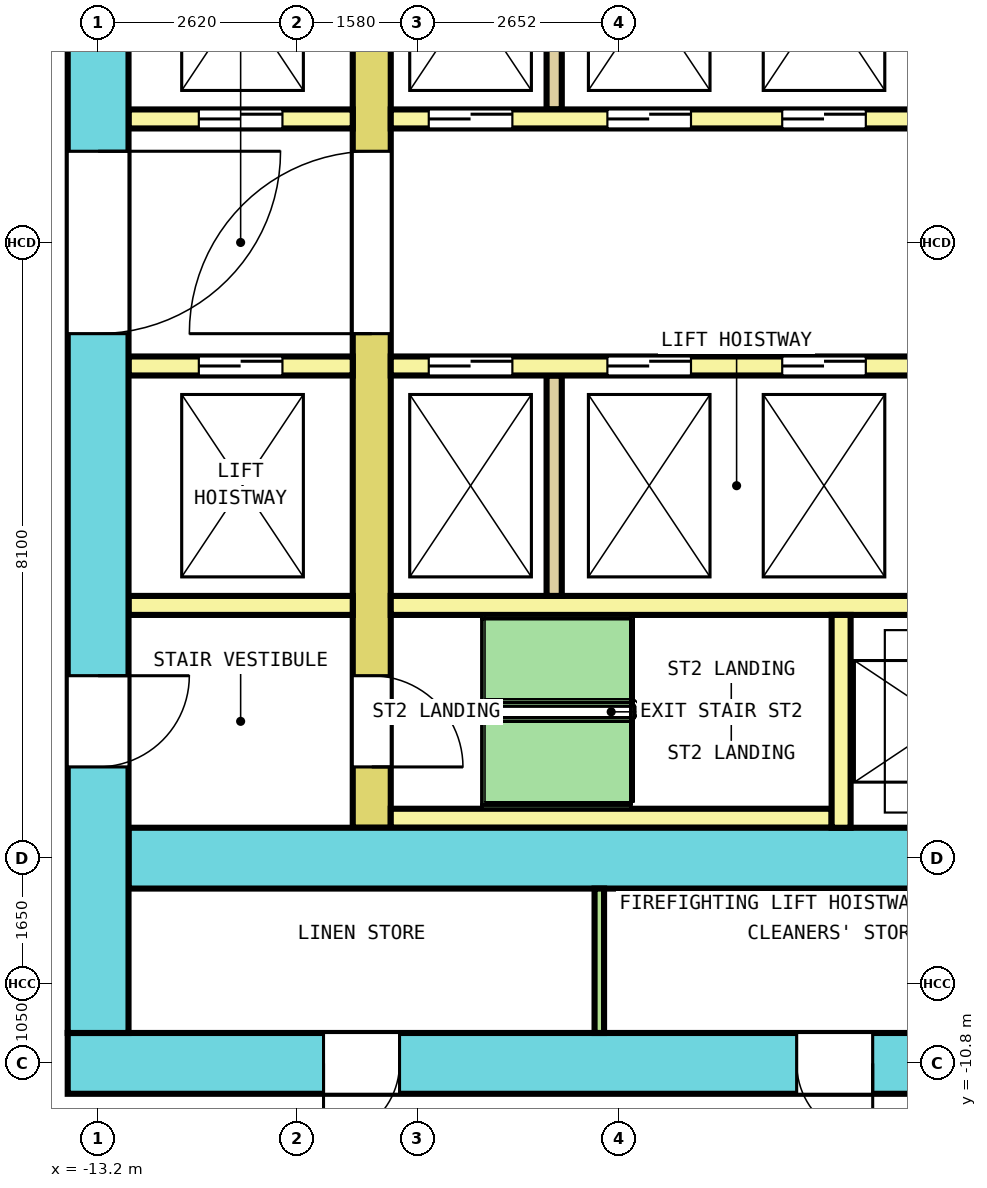
"""IFC4 building model, lengths in metres.
Left out: names, types, materials, properties, quantities, classifications, styles, units other than length and angle.
Written with IfcOpenShell. Run it as: python <this file> out.ifc"""

import sys

from ifc_helpers import new_model, si_unit, direction, frame, frame_2d, origin, place, context, subcontext, project, spatial, rectangle, extrude, element, fill, save


model = new_model("IFC4")
c1 = context("Model", 3, precision=1e-05, world=origin(), true_north=direction((0.0, 1.0)))
c2 = subcontext(c1, "Body", "Model", "MODEL_VIEW")
j1 = project(units=[si_unit("LENGTHUNIT", "METRE"), si_unit("PLANEANGLEUNIT", "RADIAN")], contexts=[c1])
p1 = place(None, origin())
s1 = spatial("IfcSite", under=j1, at=p1, CompositionType="ELEMENT")
p2 = place(p1, origin())
s2 = spatial("IfcBuilding", under=s1, at=p2, CompositionType="ELEMENT")
p3 = place(p2, frame((0.0, 0.0, 107.2)))
s3 = spatial("IfcBuildingStorey", under=s2, at=p3, CompositionType="ELEMENT", Elevation=107.2)
p4 = place(p3, frame((-13.6, -10.8, 0.0), z_axis=(0.0, 0.0, 1.0), x_axis=(1.0, 0.0, 0.0)))
e1 = element("IfcWall", 1, at=p4, inside=s3, PredefinedType="SHEAR", context=c2, shape_type="SweptSolid", body=[
    extrude(rectangle(XDim=27.2, YDim=0.8, at=frame_2d((13.6, 0.0))), origin(), (0.0, 0.0, 1.0), 5.7),
])
p5 = place(p4, frame((3.365, 0.0, 0.0)))
e2 = element("IfcOpeningElement", 2, at=p5, cuts=e1, PredefinedType="OPENING", context=c2, shape_type="SweptSolid", body=[
    extrude(rectangle(XDim=1.0, YDim=2.1, at=frame_2d((0.5, 1.05))), frame((0.0, 0.41, 0.0), z_axis=(0.0, -1.0, 0.0), x_axis=(1.0, 0.0, 0.0)), (0.0, 0.0, 1.0), 0.82),
])
p6 = place(p4, frame((9.591, 0.0, 0.0)))
e3 = element("IfcOpeningElement", 3, at=p6, cuts=e1, PredefinedType="OPENING", context=c2, shape_type="SweptSolid", body=[
    extrude(rectangle(XDim=1.0, YDim=2.1, at=frame_2d((0.5, 1.05))), frame((0.0, 0.41, 0.0), z_axis=(0.0, -1.0, 0.0), x_axis=(1.0, 0.0, 0.0)), (0.0, 0.0, 1.0), 0.82),
])
p7 = place(p4, frame((19.834, 0.0, 0.0)))
e4 = element("IfcOpeningElement", 4, at=p7, cuts=e1, PredefinedType="OPENING", context=c2, shape_type="SweptSolid", body=[
    extrude(rectangle(XDim=1.0, YDim=2.1, at=frame_2d((0.5, 1.05))), frame((0.0, 0.41, 0.0), z_axis=(0.0, -1.0, 0.0), x_axis=(1.0, 0.0, 0.0)), (0.0, 0.0, 1.0), 0.82),
])
p8 = place(p4, frame((23.909, 0.0, 0.0)))
e5 = element("IfcOpeningElement", 5, at=p8, cuts=e1, PredefinedType="OPENING", context=c2, shape_type="SweptSolid", body=[
    extrude(rectangle(XDim=1.0, YDim=2.1, at=frame_2d((0.5, 1.05))), frame((0.0, 0.41, 0.0), z_axis=(0.0, -1.0, 0.0), x_axis=(1.0, 0.0, 0.0)), (0.0, 0.0, 1.0), 0.82),
])
p9 = place(p4, frame((15.15, 0.0, 0.0)))
e6 = element("IfcOpeningElement", 6, at=p9, cuts=e1, PredefinedType="OPENING", context=c2, shape_type="SweptSolid", body=[
    extrude(rectangle(XDim=1.2, YDim=2.1, at=frame_2d((0.6, 1.05))), frame((0.0, 0.41, 0.0), z_axis=(0.0, -1.0, 0.0), x_axis=(1.0, 0.0, 0.0)), (0.0, 0.0, 1.0), 0.82),
])
p10 = place(p3, frame((-13.2, -10.4, 0.0), z_axis=(0.0, 0.0, 1.0), x_axis=(0.0, 1.0, 0.0)))
e7 = element("IfcWall", 7, at=p10, inside=s3, PredefinedType="SHEAR", context=c2, shape_type="SweptSolid", body=[
    extrude(rectangle(XDim=20.8, YDim=0.8, at=frame_2d((10.4, 0.0))), origin(), (0.0, 0.0, 1.0), 5.7),
])
p11 = place(p10, frame((9.2, 0.0, 0.0)))
e8 = element("IfcOpeningElement", 8, at=p11, cuts=e7, PredefinedType="OPENING", context=c2, shape_type="SweptSolid", body=[
    extrude(rectangle(XDim=2.4, YDim=2.1, at=frame_2d((1.2, 1.05))), frame((0.0, 0.41, 0.0), z_axis=(0.0, -1.0, 0.0), x_axis=(1.0, 0.0, 0.0)), (0.0, 0.0, 1.0), 0.82),
])
p12 = place(p10, frame((16.1, 0.0, 0.0)))
e9 = element("IfcOpeningElement", 9, at=p12, cuts=e7, PredefinedType="OPENING", context=c2, shape_type="SweptSolid", body=[
    extrude(rectangle(XDim=1.2, YDim=2.1, at=frame_2d((0.6, 1.05))), frame((0.0, 0.41, 0.0), z_axis=(0.0, -1.0, 0.0), x_axis=(1.0, 0.0, 0.0)), (0.0, 0.0, 1.0), 0.82),
])
p13 = place(p10, frame((3.5, 0.0, 0.0)))
e10 = element("IfcOpeningElement", 10, at=p13, cuts=e7, PredefinedType="OPENING", context=c2, shape_type="SweptSolid", body=[
    extrude(rectangle(XDim=1.2, YDim=2.1, at=frame_2d((0.6, 1.05))), frame((0.0, 0.41, 0.0), z_axis=(0.0, -1.0, 0.0), x_axis=(1.0, 0.0, 0.0)), (0.0, 0.0, 1.0), 0.82),
])
p14 = place(p3, frame((-12.8, -8.1, 0.0), z_axis=(0.0, 0.0, 1.0), x_axis=(1.0, 0.0, 0.0)))
e11 = element("IfcWall", 11, at=p14, inside=s3, PredefinedType="SHEAR", context=c2, shape_type="SweptSolid", body=[
    extrude(rectangle(XDim=25.6, YDim=0.8, at=frame_2d((12.8, 0.0))), origin(), (0.0, 0.0, 1.0), 5.7),
])
p15 = place(p14, frame((14.35, 0.0, 0.0)))
e12 = element("IfcOpeningElement", 12, at=p15, cuts=e11, PredefinedType="OPENING", context=c2, shape_type="SweptSolid", body=[
    extrude(rectangle(XDim=1.2, YDim=2.1, at=frame_2d((0.6, 1.05))), frame((0.0, 0.41, 0.0), z_axis=(0.0, -1.0, 0.0), x_axis=(1.0, 0.0, 0.0)), (0.0, 0.0, 1.0), 0.82),
])
p16 = place(p3, frame((-9.6, -7.7, 0.0), z_axis=(0.0, 0.0, 1.0), x_axis=(0.0, 1.0, 0.0)))
e13 = element("IfcWall", 13, at=p16, inside=s3, PredefinedType="SHEAR", context=c2, shape_type="SweptSolid", body=[
    extrude(rectangle(XDim=15.4, YDim=0.5, at=frame_2d((7.7, 0.0))), origin(), (0.0, 0.0, 1.0), 5.7),
])
p17 = place(p16, frame((6.5, 0.0, 0.0)))
e14 = element("IfcOpeningElement", 14, at=p17, cuts=e13, PredefinedType="OPENING", context=c2, shape_type="SweptSolid", body=[
    extrude(rectangle(XDim=2.4, YDim=2.1, at=frame_2d((1.2, 1.05))), frame((0.0, 0.26, 0.0), z_axis=(0.0, -1.0, 0.0), x_axis=(1.0, 0.0, 0.0)), (0.0, 0.0, 1.0), 0.52),
])
p18 = place(p16, frame((13.4, 0.0, 0.0)))
e15 = element("IfcOpeningElement", 15, at=p18, cuts=e13, PredefinedType="OPENING", context=c2, shape_type="SweptSolid", body=[
    extrude(rectangle(XDim=1.2, YDim=2.1, at=frame_2d((0.6, 1.05))), frame((0.0, 0.26, 0.0), z_axis=(0.0, -1.0, 0.0), x_axis=(1.0, 0.0, 0.0)), (0.0, 0.0, 1.0), 0.52),
])
p19 = place(p16, frame((0.8, 0.0, 0.0)))
e16 = element("IfcOpeningElement", 16, at=p19, cuts=e13, PredefinedType="OPENING", context=c2, shape_type="SweptSolid", body=[
    extrude(rectangle(XDim=1.2, YDim=2.1, at=frame_2d((0.6, 1.05))), frame((0.0, 0.26, 0.0), z_axis=(0.0, -1.0, 0.0), x_axis=(1.0, 0.0, 0.0)), (0.0, 0.0, 1.0), 0.52),
])
p20 = place(p3, frame((-12.8, 1.625, 0.0), z_axis=(0.0, 0.0, 1.0), x_axis=(1.0, 0.0, 0.0)))
e17 = element("IfcWall", 17, at=p20, inside=s3, PredefinedType="SOLIDWALL", context=c2, shape_type="SweptSolid", body=[
    extrude(rectangle(XDim=2.95, YDim=0.25, at=frame_2d((1.475, 0.0))), origin(), (0.0, 0.0, 1.0), 5.7),
])
p21 = place(p20, frame((0.925, 0.0, 0.0)))
e18 = element("IfcOpeningElement", 18, at=p21, cuts=e17, PredefinedType="OPENING", context=c2, shape_type="SweptSolid", body=[
    extrude(rectangle(XDim=1.1, YDim=2.1, at=frame_2d((0.55, 1.05))), frame((0.0, 0.135, 0.0), z_axis=(0.0, -1.0, 0.0), x_axis=(1.0, 0.0, 0.0)), (0.0, 0.0, 1.0), 0.27),
])
p22 = place(p3, frame((-9.35, 1.625, 0.0), z_axis=(0.0, 0.0, 1.0), x_axis=(1.0, 0.0, 0.0)))
e19 = element("IfcWall", 19, at=p22, inside=s3, PredefinedType="SOLIDWALL", context=c2, shape_type="SweptSolid", body=[
    extrude(rectangle(XDim=18.7, YDim=0.25, at=frame_2d((9.35, 0.0))), origin(), (0.0, 0.0, 1.0), 5.7),
])
p23 = place(p22, frame((0.5, 0.0, 0.0)))
e20 = element("IfcOpeningElement", 20, at=p23, cuts=e19, PredefinedType="OPENING", context=c2, shape_type="SweptSolid", body=[
    extrude(rectangle(XDim=1.1, YDim=2.1, at=frame_2d((0.55, 1.05))), frame((0.0, 0.135, 0.0), z_axis=(0.0, -1.0, 0.0), x_axis=(1.0, 0.0, 0.0)), (0.0, 0.0, 1.0), 0.27),
])
p24 = place(p22, frame((2.85, 0.0, 0.0)))
e21 = element("IfcOpeningElement", 21, at=p24, cuts=e19, PredefinedType="OPENING", context=c2, shape_type="SweptSolid", body=[
    extrude(rectangle(XDim=1.1, YDim=2.1, at=frame_2d((0.55, 1.05))), frame((0.0, 0.135, 0.0), z_axis=(0.0, -1.0, 0.0), x_axis=(1.0, 0.0, 0.0)), (0.0, 0.0, 1.0), 0.27),
])
p25 = place(p22, frame((5.15, 0.0, 0.0)))
e22 = element("IfcOpeningElement", 22, at=p25, cuts=e19, PredefinedType="OPENING", context=c2, shape_type="SweptSolid", body=[
    extrude(rectangle(XDim=1.1, YDim=2.1, at=frame_2d((0.55, 1.05))), frame((0.0, 0.135, 0.0), z_axis=(0.0, -1.0, 0.0), x_axis=(1.0, 0.0, 0.0)), (0.0, 0.0, 1.0), 0.27),
])
p26 = place(p22, frame((7.65, 0.0, 0.0)))
e23 = element("IfcOpeningElement", 23, at=p26, cuts=e19, PredefinedType="OPENING", context=c2, shape_type="SweptSolid", body=[
    extrude(rectangle(XDim=1.1, YDim=2.1, at=frame_2d((0.55, 1.05))), frame((0.0, 0.135, 0.0), z_axis=(0.0, -1.0, 0.0), x_axis=(1.0, 0.0, 0.0)), (0.0, 0.0, 1.0), 0.27),
])
p27 = place(p22, frame((9.95, 0.0, 0.0)))
e24 = element("IfcOpeningElement", 24, at=p27, cuts=e19, PredefinedType="OPENING", context=c2, shape_type="SweptSolid", body=[
    extrude(rectangle(XDim=1.1, YDim=2.1, at=frame_2d((0.55, 1.05))), frame((0.0, 0.135, 0.0), z_axis=(0.0, -1.0, 0.0), x_axis=(1.0, 0.0, 0.0)), (0.0, 0.0, 1.0), 0.27),
])
p28 = place(p22, frame((12.4, 0.0, 0.0)))
e25 = element("IfcOpeningElement", 25, at=p28, cuts=e19, PredefinedType="OPENING", context=c2, shape_type="SweptSolid", body=[
    extrude(rectangle(XDim=1.1, YDim=2.1, at=frame_2d((0.55, 1.05))), frame((0.0, 0.135, 0.0), z_axis=(0.0, -1.0, 0.0), x_axis=(1.0, 0.0, 0.0)), (0.0, 0.0, 1.0), 0.27),
])
p29 = place(p22, frame((14.8, 0.0, 0.0)))
e26 = element("IfcOpeningElement", 26, at=p29, cuts=e19, PredefinedType="OPENING", context=c2, shape_type="SweptSolid", body=[
    extrude(rectangle(XDim=1.1, YDim=2.1, at=frame_2d((0.55, 1.05))), frame((0.0, 0.135, 0.0), z_axis=(0.0, -1.0, 0.0), x_axis=(1.0, 0.0, 0.0)), (0.0, 0.0, 1.0), 0.27),
])
p30 = place(p22, frame((17.1, 0.0, 0.0)))
e27 = element("IfcOpeningElement", 27, at=p30, cuts=e19, PredefinedType="OPENING", context=c2, shape_type="SweptSolid", body=[
    extrude(rectangle(XDim=1.1, YDim=2.1, at=frame_2d((0.55, 1.05))), frame((0.0, 0.135, 0.0), z_axis=(0.0, -1.0, 0.0), x_axis=(1.0, 0.0, 0.0)), (0.0, 0.0, 1.0), 0.27),
])
p31 = place(p3, frame((-7.2, 1.75, 0.0), z_axis=(0.0, 0.0, 1.0), x_axis=(0.0, 1.0, 0.0)))
e28 = element("IfcWall", 28, at=p31, inside=s3, PredefinedType="SOLIDWALL", context=c2, shape_type="SweptSolid", body=[
    extrude(rectangle(XDim=2.9, YDim=0.2, at=frame_2d((1.45, 0.0))), origin(), (0.0, 0.0, 1.0), 5.7),
])
p32 = place(p3, frame((-12.8, -1.625, 0.0), z_axis=(0.0, 0.0, 1.0), x_axis=(1.0, 0.0, 0.0)))
e29 = element("IfcWall", 29, at=p32, inside=s3, PredefinedType="SOLIDWALL", context=c2, shape_type="SweptSolid", body=[
    extrude(rectangle(XDim=2.95, YDim=0.25, at=frame_2d((1.475, 0.0))), origin(), (0.0, 0.0, 1.0), 5.7),
])
p33 = place(p32, frame((0.925, 0.0, 0.0)))
e30 = element("IfcOpeningElement", 30, at=p33, cuts=e29, PredefinedType="OPENING", context=c2, shape_type="SweptSolid", body=[
    extrude(rectangle(XDim=1.1, YDim=2.1, at=frame_2d((0.55, 1.05))), frame((0.0, 0.135, 0.0), z_axis=(0.0, -1.0, 0.0), x_axis=(1.0, 0.0, 0.0)), (0.0, 0.0, 1.0), 0.27),
])
p34 = place(p3, frame((-9.35, -1.625, 0.0), z_axis=(0.0, 0.0, 1.0), x_axis=(1.0, 0.0, 0.0)))
e31 = element("IfcWall", 31, at=p34, inside=s3, PredefinedType="SOLIDWALL", context=c2, shape_type="SweptSolid", body=[
    extrude(rectangle(XDim=18.7, YDim=0.25, at=frame_2d((9.35, 0.0))), origin(), (0.0, 0.0, 1.0), 5.7),
])
p35 = place(p34, frame((0.5, 0.0, 0.0)))
e32 = element("IfcOpeningElement", 32, at=p35, cuts=e31, PredefinedType="OPENING", context=c2, shape_type="SweptSolid", body=[
    extrude(rectangle(XDim=1.1, YDim=2.1, at=frame_2d((0.55, 1.05))), frame((0.0, 0.135, 0.0), z_axis=(0.0, -1.0, 0.0), x_axis=(1.0, 0.0, 0.0)), (0.0, 0.0, 1.0), 0.27),
])
p36 = place(p34, frame((2.85, 0.0, 0.0)))
e33 = element("IfcOpeningElement", 33, at=p36, cuts=e31, PredefinedType="OPENING", context=c2, shape_type="SweptSolid", body=[
    extrude(rectangle(XDim=1.1, YDim=2.1, at=frame_2d((0.55, 1.05))), frame((0.0, 0.135, 0.0), z_axis=(0.0, -1.0, 0.0), x_axis=(1.0, 0.0, 0.0)), (0.0, 0.0, 1.0), 0.27),
])
p37 = place(p34, frame((5.15, 0.0, 0.0)))
e34 = element("IfcOpeningElement", 34, at=p37, cuts=e31, PredefinedType="OPENING", context=c2, shape_type="SweptSolid", body=[
    extrude(rectangle(XDim=1.1, YDim=2.1, at=frame_2d((0.55, 1.05))), frame((0.0, 0.135, 0.0), z_axis=(0.0, -1.0, 0.0), x_axis=(1.0, 0.0, 0.0)), (0.0, 0.0, 1.0), 0.27),
])
p38 = place(p34, frame((7.65, 0.0, 0.0)))
e35 = element("IfcOpeningElement", 35, at=p38, cuts=e31, PredefinedType="OPENING", context=c2, shape_type="SweptSolid", body=[
    extrude(rectangle(XDim=1.1, YDim=2.1, at=frame_2d((0.55, 1.05))), frame((0.0, 0.135, 0.0), z_axis=(0.0, -1.0, 0.0), x_axis=(1.0, 0.0, 0.0)), (0.0, 0.0, 1.0), 0.27),
])
p39 = place(p34, frame((9.95, 0.0, 0.0)))
e36 = element("IfcOpeningElement", 36, at=p39, cuts=e31, PredefinedType="OPENING", context=c2, shape_type="SweptSolid", body=[
    extrude(rectangle(XDim=1.1, YDim=2.1, at=frame_2d((0.55, 1.05))), frame((0.0, 0.135, 0.0), z_axis=(0.0, -1.0, 0.0), x_axis=(1.0, 0.0, 0.0)), (0.0, 0.0, 1.0), 0.27),
])
p40 = place(p34, frame((12.4, 0.0, 0.0)))
e37 = element("IfcOpeningElement", 37, at=p40, cuts=e31, PredefinedType="OPENING", context=c2, shape_type="SweptSolid", body=[
    extrude(rectangle(XDim=1.1, YDim=2.1, at=frame_2d((0.55, 1.05))), frame((0.0, 0.135, 0.0), z_axis=(0.0, -1.0, 0.0), x_axis=(1.0, 0.0, 0.0)), (0.0, 0.0, 1.0), 0.27),
])
p41 = place(p34, frame((14.8, 0.0, 0.0)))
e38 = element("IfcOpeningElement", 38, at=p41, cuts=e31, PredefinedType="OPENING", context=c2, shape_type="SweptSolid", body=[
    extrude(rectangle(XDim=1.1, YDim=2.1, at=frame_2d((0.55, 1.05))), frame((0.0, 0.135, 0.0), z_axis=(0.0, -1.0, 0.0), x_axis=(1.0, 0.0, 0.0)), (0.0, 0.0, 1.0), 0.27),
])
p42 = place(p34, frame((17.1, 0.0, 0.0)))
e39 = element("IfcOpeningElement", 39, at=p42, cuts=e31, PredefinedType="OPENING", context=c2, shape_type="SweptSolid", body=[
    extrude(rectangle(XDim=1.1, YDim=2.1, at=frame_2d((0.55, 1.05))), frame((0.0, 0.135, 0.0), z_axis=(0.0, -1.0, 0.0), x_axis=(1.0, 0.0, 0.0)), (0.0, 0.0, 1.0), 0.27),
])
p43 = place(p3, frame((-12.8, -4.775, 0.0), z_axis=(0.0, 0.0, 1.0), x_axis=(1.0, 0.0, 0.0)))
e40 = element("IfcWall", 40, at=p43, inside=s3, PredefinedType="SOLIDWALL", context=c2, shape_type="SweptSolid", body=[
    extrude(rectangle(XDim=2.95, YDim=0.25, at=frame_2d((1.475, 0.0))), origin(), (0.0, 0.0, 1.0), 5.7),
])
p44 = place(p3, frame((-9.35, -4.775, 0.0), z_axis=(0.0, 0.0, 1.0), x_axis=(1.0, 0.0, 0.0)))
e41 = element("IfcWall", 41, at=p44, inside=s3, PredefinedType="SOLIDWALL", context=c2, shape_type="SweptSolid", body=[
    extrude(rectangle(XDim=18.7, YDim=0.25, at=frame_2d((9.35, 0.0))), origin(), (0.0, 0.0, 1.0), 5.7),
])
p45 = place(p3, frame((-7.2, -4.65, 0.0), z_axis=(0.0, 0.0, 1.0), x_axis=(0.0, 1.0, 0.0)))
e42 = element("IfcWall", 42, at=p45, inside=s3, PredefinedType="SOLIDWALL", context=c2, shape_type="SweptSolid", body=[
    extrude(rectangle(XDim=2.9, YDim=0.2, at=frame_2d((1.45, 0.0))), origin(), (0.0, 0.0, 1.0), 5.7),
])
p46 = place(p3, frame((-9.35, -7.575, 0.0), z_axis=(0.0, 0.0, 1.0), x_axis=(1.0, 0.0, 0.0)))
e43 = element("IfcWall", 43, at=p46, inside=s3, PredefinedType="SOLIDWALL", context=c2, shape_type="SweptSolid", body=[
    extrude(rectangle(XDim=5.8, YDim=0.25, at=frame_2d((2.9, 0.0))), origin(), (0.0, 0.0, 1.0), 5.7),
])
p47 = place(p3, frame((-3.425, -7.7, 0.0), z_axis=(0.0, 0.0, 1.0), x_axis=(0.0, 1.0, 0.0)))
e44 = element("IfcWall", 44, at=p47, inside=s3, PredefinedType="SOLIDWALL", context=c2, shape_type="SweptSolid", body=[
    extrude(rectangle(XDim=2.8, YDim=0.25, at=frame_2d((1.4, 0.0))), origin(), (0.0, 0.0, 1.0), 5.7),
])
p48 = place(p3, frame((-6.606, -10.4, 0.0), z_axis=(0.0, 0.0, 1.0), x_axis=(0.0, 1.0, 0.0)))
e45 = element("IfcWall", 45, at=p48, inside=s3, PredefinedType="PARTITIONING", context=c2, shape_type="SweptSolid", body=[
    extrude(rectangle(XDim=1.9, YDim=0.125, at=frame_2d((0.95, 0.0))), origin(), (0.0, 0.0, 1.0), 5.7),
])
p49 = place(p21, origin())
e46 = element("IfcDoor", 46, at=p49, inside=s3, OperationType="DOUBLE_DOOR_SLIDING", PredefinedType="DOOR", context=c2, shape_type="SweptSolid", body=[
    extrude(rectangle(XDim=1.1, YDim=2.1, at=frame_2d((0.55, 1.05))), frame((0.0, 0.075, 0.0), z_axis=(0.0, -1.0, 0.0), x_axis=(1.0, 0.0, 0.0)), (0.0, 0.0, 1.0), 0.15),
])
fill(e18, e46)
p50 = place(p23, origin())
e47 = element("IfcDoor", 47, at=p50, inside=s3, OperationType="DOUBLE_DOOR_SLIDING", PredefinedType="DOOR", context=c2, shape_type="SweptSolid", body=[
    extrude(rectangle(XDim=1.1, YDim=2.1, at=frame_2d((0.55, 1.05))), frame((0.0, 0.075, 0.0), z_axis=(0.0, -1.0, 0.0), x_axis=(1.0, 0.0, 0.0)), (0.0, 0.0, 1.0), 0.15),
])
fill(e20, e47)
p51 = place(p24, origin())
e48 = element("IfcDoor", 48, at=p51, inside=s3, OperationType="DOUBLE_DOOR_SLIDING", PredefinedType="DOOR", context=c2, shape_type="SweptSolid", body=[
    extrude(rectangle(XDim=1.1, YDim=2.1, at=frame_2d((0.55, 1.05))), frame((0.0, 0.075, 0.0), z_axis=(0.0, -1.0, 0.0), x_axis=(1.0, 0.0, 0.0)), (0.0, 0.0, 1.0), 0.15),
])
fill(e21, e48)
p52 = place(p25, origin())
e49 = element("IfcDoor", 49, at=p52, inside=s3, OperationType="DOUBLE_DOOR_SLIDING", PredefinedType="DOOR", context=c2, shape_type="SweptSolid", body=[
    extrude(rectangle(XDim=1.1, YDim=2.1, at=frame_2d((0.55, 1.05))), frame((0.0, 0.075, 0.0), z_axis=(0.0, -1.0, 0.0), x_axis=(1.0, 0.0, 0.0)), (0.0, 0.0, 1.0), 0.15),
])
fill(e22, e49)
p53 = place(p33, origin())
e50 = element("IfcDoor", 50, at=p53, inside=s3, OperationType="DOUBLE_DOOR_SLIDING", PredefinedType="DOOR", context=c2, shape_type="SweptSolid", body=[
    extrude(rectangle(XDim=1.1, YDim=2.1, at=frame_2d((0.55, 1.05))), frame((0.0, 0.075, 0.0), z_axis=(0.0, -1.0, 0.0), x_axis=(1.0, 0.0, 0.0)), (0.0, 0.0, 1.0), 0.15),
])
fill(e30, e50)
p54 = place(p35, origin())
e51 = element("IfcDoor", 51, at=p54, inside=s3, OperationType="DOUBLE_DOOR_SLIDING", PredefinedType="DOOR", context=c2, shape_type="SweptSolid", body=[
    extrude(rectangle(XDim=1.1, YDim=2.1, at=frame_2d((0.55, 1.05))), frame((0.0, 0.075, 0.0), z_axis=(0.0, -1.0, 0.0), x_axis=(1.0, 0.0, 0.0)), (0.0, 0.0, 1.0), 0.15),
])
fill(e32, e51)
p55 = place(p36, origin())
e52 = element("IfcDoor", 52, at=p55, inside=s3, OperationType="DOUBLE_DOOR_SLIDING", PredefinedType="DOOR", context=c2, shape_type="SweptSolid", body=[
    extrude(rectangle(XDim=1.1, YDim=2.1, at=frame_2d((0.55, 1.05))), frame((0.0, 0.075, 0.0), z_axis=(0.0, -1.0, 0.0), x_axis=(1.0, 0.0, 0.0)), (0.0, 0.0, 1.0), 0.15),
])
fill(e33, e52)
p56 = place(p37, origin())
e53 = element("IfcDoor", 53, at=p56, inside=s3, OperationType="DOUBLE_DOOR_SLIDING", PredefinedType="DOOR", context=c2, shape_type="SweptSolid", body=[
    extrude(rectangle(XDim=1.1, YDim=2.1, at=frame_2d((0.55, 1.05))), frame((0.0, 0.075, 0.0), z_axis=(0.0, -1.0, 0.0), x_axis=(1.0, 0.0, 0.0)), (0.0, 0.0, 1.0), 0.15),
])
fill(e34, e53)
p57 = place(p17, origin())
e54 = element("IfcDoor", 54, at=p57, inside=s3, OperationType="DOUBLE_DOOR_SINGLE_SWING", PredefinedType="DOOR", context=c2, shape_type="SweptSolid", body=[
    extrude(rectangle(XDim=2.4, YDim=2.1, at=frame_2d((1.2, 1.05))), frame((0.0, 0.2, 0.0), z_axis=(0.0, -1.0, 0.0), x_axis=(1.0, 0.0, 0.0)), (0.0, 0.0, 1.0), 0.4),
])
fill(e14, e54)
p58 = place(p11, origin())
e55 = element("IfcDoor", 55, at=p58, inside=s3, OperationType="DOUBLE_DOOR_SINGLE_SWING", PredefinedType="DOOR", context=c2, shape_type="SweptSolid", body=[
    extrude(rectangle(XDim=2.4, YDim=2.1, at=frame_2d((1.2, 1.05))), frame((0.0, 0.3, 0.0), z_axis=(0.0, -1.0, 0.0), x_axis=(1.0, 0.0, 0.0)), (0.0, 0.0, 1.0), 0.6),
])
fill(e8, e55)
p59 = place(p19, origin())
e56 = element("IfcDoor", 56, at=p59, inside=s3, OperationType="SINGLE_SWING_RIGHT", PredefinedType="DOOR", context=c2, shape_type="SweptSolid", body=[
    extrude(rectangle(XDim=1.2, YDim=2.1, at=frame_2d((0.6, 1.05))), frame((0.0, 0.2, 0.0), z_axis=(0.0, -1.0, 0.0), x_axis=(1.0, 0.0, 0.0)), (0.0, 0.0, 1.0), 0.4),
])
fill(e16, e56)
p60 = place(p13, origin())
e57 = element("IfcDoor", 57, at=p60, inside=s3, OperationType="SINGLE_SWING_LEFT", PredefinedType="DOOR", context=c2, shape_type="SweptSolid", body=[
    extrude(rectangle(XDim=1.2, YDim=2.1, at=frame_2d((0.6, 1.05))), frame((0.0, 0.3, 0.0), z_axis=(0.0, -1.0, 0.0), x_axis=(1.0, 0.0, 0.0)), (0.0, 0.0, 1.0), 0.6),
])
fill(e10, e57)
p61 = place(p5, origin())
e58 = element("IfcDoor", 58, at=p61, inside=s3, OperationType="SINGLE_SWING_LEFT", PredefinedType="DOOR", context=c2, shape_type="SweptSolid", body=[
    extrude(rectangle(XDim=1.0, YDim=2.1, at=frame_2d((0.5, 1.05))), frame((0.0, 0.3, 0.0), z_axis=(0.0, -1.0, 0.0), x_axis=(1.0, 0.0, 0.0)), (0.0, 0.0, 1.0), 0.6),
])
fill(e2, e58)
p62 = place(p6, origin())
e59 = element("IfcDoor", 59, at=p62, inside=s3, OperationType="SINGLE_SWING_RIGHT", PredefinedType="DOOR", context=c2, shape_type="SweptSolid", body=[
    extrude(rectangle(XDim=1.0, YDim=2.1, at=frame_2d((0.5, 1.05))), frame((0.0, 0.3, 0.0), z_axis=(0.0, -1.0, 0.0), x_axis=(1.0, 0.0, 0.0)), (0.0, 0.0, 1.0), 0.6),
])
fill(e3, e59)
save(model, sys.argv[1])
